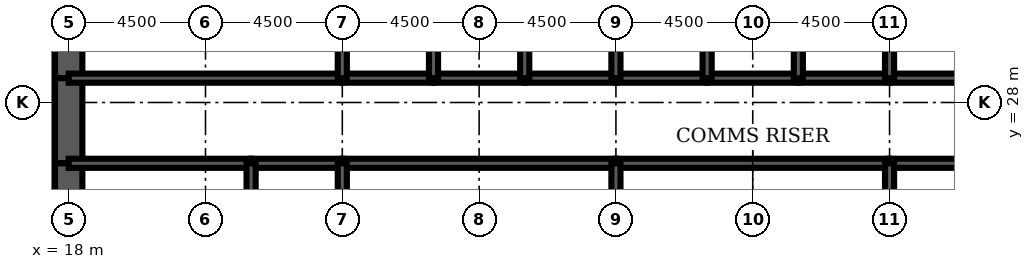
"""IFC4 building model, lengths in metres.
Left out: names, types, materials, properties, quantities, classifications, styles, units other than length and angle.
Written with IfcOpenShell. Run it as: python <this file> out.ifc"""

import sys

from ifc_helpers import new_model, si_unit, direction, frame, frame_2d, origin, place, context, subcontext, project, spatial, rectangle, extrude, element, fill, save


model = new_model("IFC4")
c1 = context("Model", 3, precision=1e-05, world=origin(), true_north=direction((0.0, 1.0)))
c2 = subcontext(c1, "Body", "Model", "MODEL_VIEW")
j1 = project(units=[si_unit("LENGTHUNIT", "METRE"), si_unit("PLANEANGLEUNIT", "RADIAN")], contexts=[c1])
p1 = place(None, origin())
s1 = spatial("IfcSite", under=j1, at=p1, CompositionType="ELEMENT")
p2 = place(p1, origin())
s2 = spatial("IfcBuilding", under=s1, at=p2, CompositionType="ELEMENT")
p3 = place(p2, frame((0.0, 0.0, 150.9)))
s3 = spatial("IfcBuildingStorey", under=s2, at=p3, CompositionType="ELEMENT", Elevation=150.9)
p4 = place(p3, frame((18.0, 32.0, 0.0), z_axis=(0.0, 0.0, 1.0), x_axis=(0.0, -1.0, 0.0)))
e1 = element("IfcWall", 1, at=p4, inside=s3, PredefinedType="SHEAR", context=c2, shape_type="SweptSolid", body=[
    extrude(rectangle(XDim=3.2, YDim=0.9, at=frame_2d((1.6, 0.0))), origin(), (0.0, 0.0, 1.0), 4.2),
])
p5 = place(p3, frame((18.0, 28.8, 0.0), z_axis=(0.0, 0.0, 1.0), x_axis=(0.0, -1.0, 0.0)))
e2 = element("IfcWall", 2, at=p5, inside=s3, PredefinedType="SHEAR", context=c2, shape_type="SweptSolid", body=[
    extrude(rectangle(XDim=2.8, YDim=0.9, at=frame_2d((1.4, 0.0))), origin(), (0.0, 0.0, 1.0), 4.2),
])
p6 = place(p5, frame((0.4, 0.0, 0.0)))
e3 = element("IfcOpeningElement", 3, at=p6, cuts=e2, PredefinedType="OPENING", context=c2, shape_type="SweptSolid", body=[
    extrude(rectangle(XDim=1.8, YDim=2.1, at=frame_2d((0.9, 1.05))), frame((0.0, 0.46, 0.0), z_axis=(0.0, -1.0, 0.0), x_axis=(1.0, 0.0, 0.0)), (0.0, 0.0, 1.0), 0.92),
])
p7 = place(p3, frame((18.0, 26.0, 0.0), z_axis=(0.0, 0.0, 1.0), x_axis=(0.0, -1.0, 0.0)))
e4 = element("IfcWall", 4, at=p7, inside=s3, PredefinedType="SHEAR", context=c2, shape_type="SweptSolid", body=[
    extrude(rectangle(XDim=4.0, YDim=0.9, at=frame_2d((2.0, 0.0))), origin(), (0.0, 0.0, 1.0), 4.2),
])
p8 = place(p3, frame((18.0, 28.8, 0.0), z_axis=(0.0, 0.0, 1.0), x_axis=(1.0, 0.0, 0.0)))
e5 = element("IfcWall", 5, at=p8, inside=s3, PredefinedType="SOLIDWALL", context=c2, shape_type="SweptSolid", body=[
    extrude(rectangle(XDim=9.0, YDim=0.3, at=frame_2d((4.5, 0.0))), origin(), (0.0, 0.0, 1.0), 4.2),
])
p9 = place(p8, frame((0.65, 0.0, 0.0)))
e6 = element("IfcOpeningElement", 6, at=p9, cuts=e5, PredefinedType="OPENING", context=c2, shape_type="SweptSolid", body=[
    extrude(rectangle(XDim=1.0, YDim=2.1, at=frame_2d((0.5, 1.05))), frame((0.0, 0.16, 0.0), z_axis=(0.0, -1.0, 0.0), x_axis=(1.0, 0.0, 0.0)), (0.0, 0.0, 1.0), 0.32),
])
p10 = place(p3, frame((27.0, 28.8, 0.0), z_axis=(0.0, 0.0, 1.0), x_axis=(1.0, 0.0, 0.0)))
e7 = element("IfcWall", 7, at=p10, inside=s3, PredefinedType="SOLIDWALL", context=c2, shape_type="SweptSolid", body=[
    extrude(rectangle(XDim=3.0, YDim=0.3, at=frame_2d((1.5, 0.0))), origin(), (0.0, 0.0, 1.0), 4.2),
])
p11 = place(p10, frame((0.95, 0.0, 0.0)))
e8 = element("IfcOpeningElement", 8, at=p11, cuts=e7, PredefinedType="OPENING", context=c2, shape_type="SweptSolid", body=[
    extrude(rectangle(XDim=1.1, YDim=2.2, at=frame_2d((0.55, 1.1))), frame((0.0, 0.16, 0.0), z_axis=(0.0, -1.0, 0.0), x_axis=(1.0, 0.0, 0.0)), (0.0, 0.0, 1.0), 0.32),
])
p12 = place(p3, frame((30.0, 28.8, 0.0), z_axis=(0.0, 0.0, 1.0), x_axis=(1.0, 0.0, 0.0)))
e9 = element("IfcWall", 9, at=p12, inside=s3, PredefinedType="SOLIDWALL", context=c2, shape_type="SweptSolid", body=[
    extrude(rectangle(XDim=3.0, YDim=0.3, at=frame_2d((1.5, 0.0))), origin(), (0.0, 0.0, 1.0), 4.2),
])
p13 = place(p12, frame((0.95, 0.0, 0.0)))
e10 = element("IfcOpeningElement", 10, at=p13, cuts=e9, PredefinedType="OPENING", context=c2, shape_type="SweptSolid", body=[
    extrude(rectangle(XDim=1.1, YDim=2.2, at=frame_2d((0.55, 1.1))), frame((0.0, 0.16, 0.0), z_axis=(0.0, -1.0, 0.0), x_axis=(1.0, 0.0, 0.0)), (0.0, 0.0, 1.0), 0.32),
])
p14 = place(p3, frame((33.0, 28.8, 0.0), z_axis=(0.0, 0.0, 1.0), x_axis=(1.0, 0.0, 0.0)))
e11 = element("IfcWall", 11, at=p14, inside=s3, PredefinedType="SOLIDWALL", context=c2, shape_type="SweptSolid", body=[
    extrude(rectangle(XDim=3.0, YDim=0.3, at=frame_2d((1.5, 0.0))), origin(), (0.0, 0.0, 1.0), 4.2),
])
p15 = place(p14, frame((0.95, 0.0, 0.0)))
e12 = element("IfcOpeningElement", 12, at=p15, cuts=e11, PredefinedType="OPENING", context=c2, shape_type="SweptSolid", body=[
    extrude(rectangle(XDim=1.1, YDim=2.2, at=frame_2d((0.55, 1.1))), frame((0.0, 0.16, 0.0), z_axis=(0.0, -1.0, 0.0), x_axis=(1.0, 0.0, 0.0)), (0.0, 0.0, 1.0), 0.32),
])
for number, where, z_axis, x_axis in (
    (13, (36.0, 28.8, 0.0), (0.0, 0.0, 1.0), (1.0, 0.0, 0.0)),
    (14, (39.0, 28.8, 0.0), (0.0, 0.0, 1.0), (1.0, 0.0, 0.0)),
):
    element("IfcWall", number, at=place(p3, frame(where, z_axis=z_axis, x_axis=x_axis)), inside=s3, PredefinedType="SOLIDWALL", context=c2, shape_type="SweptSolid", body=[
        extrude(rectangle(XDim=3.0, YDim=0.3, at=frame_2d((1.5, 0.0))), origin(), (0.0, 0.0, 1.0), 4.2),
    ])
p16 = place(p3, frame((42.0, 28.8, 0.0), z_axis=(0.0, 0.0, 1.0), x_axis=(1.0, 0.0, 0.0)))
e15 = element("IfcWall", 15, at=p16, inside=s3, PredefinedType="SOLIDWALL", context=c2, shape_type="SweptSolid", body=[
    extrude(rectangle(XDim=3.0, YDim=0.3, at=frame_2d((1.5, 0.0))), origin(), (0.0, 0.0, 1.0), 4.2),
])
p17 = place(p16, frame((0.95, 0.0, 0.0)))
e16 = element("IfcOpeningElement", 16, at=p17, cuts=e15, PredefinedType="OPENING", context=c2, shape_type="SweptSolid", body=[
    extrude(rectangle(XDim=1.1, YDim=2.2, at=frame_2d((0.55, 1.1))), frame((0.0, 0.16, 0.0), z_axis=(0.0, -1.0, 0.0), x_axis=(1.0, 0.0, 0.0)), (0.0, 0.0, 1.0), 0.32),
])
p18 = place(p3, frame((45.0, 28.8, 0.0), z_axis=(0.0, 0.0, 1.0), x_axis=(1.0, 0.0, 0.0)))
e17 = element("IfcWall", 17, at=p18, inside=s3, PredefinedType="SOLIDWALL", context=c2, shape_type="SweptSolid", body=[
    extrude(rectangle(XDim=9.0, YDim=0.3, at=frame_2d((4.5, 0.0))), origin(), (0.0, 0.0, 1.0), 4.2),
])
p19 = place(p18, frame((7.35, 0.0, 0.0)))
e18 = element("IfcOpeningElement", 18, at=p19, cuts=e17, PredefinedType="OPENING", context=c2, shape_type="SweptSolid", body=[
    extrude(rectangle(XDim=1.0, YDim=2.1, at=frame_2d((0.5, 1.05))), frame((0.0, 0.16, 0.0), z_axis=(0.0, -1.0, 0.0), x_axis=(1.0, 0.0, 0.0)), (0.0, 0.0, 1.0), 0.32),
])
p20 = place(p3, frame((18.0, 26.0, 0.0), z_axis=(0.0, 0.0, 1.0), x_axis=(1.0, 0.0, 0.0)))
e19 = element("IfcWall", 19, at=p20, inside=s3, PredefinedType="SOLIDWALL", context=c2, shape_type="SweptSolid", body=[
    extrude(rectangle(XDim=6.0, YDim=0.3, at=frame_2d((3.0, 0.0))), origin(), (0.0, 0.0, 1.0), 4.2),
])
p21 = place(p3, frame((24.0, 26.0, 0.0), z_axis=(0.0, 0.0, 1.0), x_axis=(1.0, 0.0, 0.0)))
e20 = element("IfcWall", 20, at=p21, inside=s3, PredefinedType="SOLIDWALL", context=c2, shape_type="SweptSolid", body=[
    extrude(rectangle(XDim=3.0, YDim=0.3, at=frame_2d((1.5, 0.0))), origin(), (0.0, 0.0, 1.0), 4.2),
])
for number, where, z_axis, x_axis in (
    (21, (27.0, 26.0, 0.0), (0.0, 0.0, 1.0), (1.0, 0.0, 0.0)),
    (22, (36.0, 26.0, 0.0), (0.0, 0.0, 1.0), (1.0, 0.0, 0.0)),
):
    element("IfcWall", number, at=place(p3, frame(where, z_axis=z_axis, x_axis=x_axis)), inside=s3, PredefinedType="SOLIDWALL", context=c2, shape_type="SweptSolid", body=[
        extrude(rectangle(XDim=9.0, YDim=0.3, at=frame_2d((4.5, 0.0))), origin(), (0.0, 0.0, 1.0), 4.2),
    ])
p22 = place(p3, frame((45.0, 26.0, 0.0), z_axis=(0.0, 0.0, 1.0), x_axis=(1.0, 0.0, 0.0)))
e23 = element("IfcWall", 23, at=p22, inside=s3, PredefinedType="SOLIDWALL", context=c2, shape_type="SweptSolid", body=[
    extrude(rectangle(XDim=3.0, YDim=0.3, at=frame_2d((1.5, 0.0))), origin(), (0.0, 0.0, 1.0), 4.2),
])
for number, where, z_axis, x_axis in (
    (24, (27.0, 28.8, 0.0), (0.0, 0.0, 1.0), (0.0, 1.0, 0.0)),
    (25, (30.0, 28.8, 0.0), (0.0, 0.0, 1.0), (0.0, 1.0, 0.0)),
    (26, (33.0, 28.8, 0.0), (0.0, 0.0, 1.0), (0.0, 1.0, 0.0)),
    (27, (36.0, 28.8, 0.0), (0.0, 0.0, 1.0), (0.0, 1.0, 0.0)),
    (28, (39.0, 28.8, 0.0), (0.0, 0.0, 1.0), (0.0, 1.0, 0.0)),
    (29, (42.0, 28.8, 0.0), (0.0, 0.0, 1.0), (0.0, 1.0, 0.0)),
    (30, (45.0, 28.8, 0.0), (0.0, 0.0, 1.0), (0.0, 1.0, 0.0)),
):
    element("IfcWall", number, at=place(p3, frame(where, z_axis=z_axis, x_axis=x_axis)), inside=s3, PredefinedType="SOLIDWALL", context=c2, shape_type="SweptSolid", body=[
        extrude(rectangle(XDim=3.2, YDim=0.3, at=frame_2d((1.6, 0.0))), origin(), (0.0, 0.0, 1.0), 4.2),
    ])
for number, where, z_axis, x_axis in (
    (31, (24.0, 22.0, 0.0), (0.0, 0.0, 1.0), (0.0, 1.0, 0.0)),
    (32, (27.0, 22.0, 0.0), (0.0, 0.0, 1.0), (0.0, 1.0, 0.0)),
    (33, (36.0, 22.0, 0.0), (0.0, 0.0, 1.0), (0.0, 1.0, 0.0)),
    (34, (45.0, 22.0, 0.0), (0.0, 0.0, 1.0), (0.0, 1.0, 0.0)),
):
    element("IfcWall", number, at=place(p3, frame(where, z_axis=z_axis, x_axis=x_axis)), inside=s3, PredefinedType="SOLIDWALL", context=c2, shape_type="SweptSolid", body=[
        extrude(rectangle(XDim=4.0, YDim=0.3, at=frame_2d((2.0, 0.0))), origin(), (0.0, 0.0, 1.0), 4.2),
    ])
p23 = place(p3, frame((42.5, 22.15, 0.0), z_axis=(0.0, 0.0, 1.0), x_axis=(0.0, 1.0, 0.0)))
e35 = element("IfcWall", 35, at=p23, inside=s3, PredefinedType="PARTITIONING", context=c2, shape_type="SweptSolid", body=[
    extrude(rectangle(XDim=3.7, YDim=0.15, at=frame_2d((1.85, 0.0))), origin(), (0.0, 0.0, 1.0), 3.0),
])
p24 = place(p23, frame((2.2, 0.0, 0.0)))
e36 = element("IfcOpeningElement", 36, at=p24, cuts=e35, PredefinedType="OPENING", context=c2, shape_type="SweptSolid", body=[
    extrude(rectangle(XDim=1.0, YDim=2.1, at=frame_2d((0.5, 1.05))), frame((0.0, 0.085, 0.0), z_axis=(0.0, -1.0, 0.0), x_axis=(1.0, 0.0, 0.0)), (0.0, 0.0, 1.0), 0.17),
])
p25 = place(p3, frame((20.325, 22.15, 0.0), z_axis=(0.0, 0.0, 1.0), x_axis=(0.0, 1.0, 0.0)))
e37 = element("IfcWall", 37, at=p25, inside=s3, PredefinedType="PARTITIONING", context=c2, shape_type="SweptSolid", body=[
    extrude(rectangle(XDim=3.7, YDim=0.15, at=frame_2d((1.85, 0.0))), origin(), (0.0, 0.0, 1.0), 3.0),
])
p26 = place(p3, frame((46.2, 26.15, 0.0), z_axis=(0.0, 0.0, 1.0), x_axis=(0.0, 1.0, 0.0)))
e38 = element("IfcWall", 38, at=p26, inside=s3, PredefinedType="PARTITIONING", context=c2, shape_type="SweptSolid", body=[
    extrude(rectangle(XDim=2.5, YDim=0.15, at=frame_2d((1.25, 0.0))), origin(), (0.0, 0.0, 1.0), 3.0),
])
p27 = place(p26, frame((1.15, 0.0, 0.0)))
e39 = element("IfcOpeningElement", 39, at=p27, cuts=e38, PredefinedType="OPENING", context=c2, shape_type="SweptSolid", body=[
    extrude(rectangle(XDim=1.0, YDim=2.1, at=frame_2d((0.5, 1.05))), frame((0.0, 0.085, 0.0), z_axis=(0.0, -1.0, 0.0), x_axis=(1.0, 0.0, 0.0)), (0.0, 0.0, 1.0), 0.17),
])
p28 = place(p24, origin())
e40 = element("IfcDoor", 40, at=p28, inside=s3, OperationType="SINGLE_SWING_RIGHT", PredefinedType="DOOR", context=c2, shape_type="SweptSolid", body=[
    extrude(rectangle(XDim=1.0, YDim=2.1, at=frame_2d((0.5, 1.05))), frame((0.0, 0.025, 0.0), z_axis=(0.0, -1.0, 0.0), x_axis=(1.0, 0.0, 0.0)), (0.0, 0.0, 1.0), 0.05),
])
fill(e36, e40)
p29 = place(p27, origin())
e41 = element("IfcDoor", 41, at=p29, inside=s3, OperationType="SINGLE_SWING_RIGHT", PredefinedType="DOOR", context=c2, shape_type="SweptSolid", body=[
    extrude(rectangle(XDim=1.0, YDim=2.1, at=frame_2d((0.5, 1.05))), frame((0.0, 0.025, 0.0), z_axis=(0.0, -1.0, 0.0), x_axis=(1.0, 0.0, 0.0)), (0.0, 0.0, 1.0), 0.05),
])
fill(e39, e41)
p30 = place(p17, origin())
e42 = element("IfcDoor", 42, at=p30, inside=s3, OperationType="DOUBLE_DOOR_SLIDING", PredefinedType="USERDEFINED", context=c2, shape_type="SweptSolid", body=[
    extrude(rectangle(XDim=1.1, YDim=2.2, at=frame_2d((0.55, 1.1))), frame((0.0, 0.025, 0.0), z_axis=(0.0, -1.0, 0.0), x_axis=(1.0, 0.0, 0.0)), (0.0, 0.0, 1.0), 0.05),
])
fill(e16, e42)
p31 = place(p11, origin())
e43 = element("IfcDoor", 43, at=p31, inside=s3, OperationType="DOUBLE_DOOR_SLIDING", PredefinedType="USERDEFINED", context=c2, shape_type="SweptSolid", body=[
    extrude(rectangle(XDim=1.1, YDim=2.2, at=frame_2d((0.55, 1.1))), frame((0.0, 0.025, 0.0), z_axis=(0.0, -1.0, 0.0), x_axis=(1.0, 0.0, 0.0)), (0.0, 0.0, 1.0), 0.05),
])
fill(e8, e43)
p32 = place(p13, origin())
e44 = element("IfcDoor", 44, at=p32, inside=s3, OperationType="DOUBLE_DOOR_SLIDING", PredefinedType="USERDEFINED", context=c2, shape_type="SweptSolid", body=[
    extrude(rectangle(XDim=1.1, YDim=2.2, at=frame_2d((0.55, 1.1))), frame((0.0, 0.025, 0.0), z_axis=(0.0, -1.0, 0.0), x_axis=(1.0, 0.0, 0.0)), (0.0, 0.0, 1.0), 0.05),
])
fill(e10, e44)
p33 = place(p15, origin())
e45 = element("IfcDoor", 45, at=p33, inside=s3, OperationType="DOUBLE_DOOR_SLIDING", PredefinedType="USERDEFINED", context=c2, shape_type="SweptSolid", body=[
    extrude(rectangle(XDim=1.1, YDim=2.2, at=frame_2d((0.55, 1.1))), frame((0.0, 0.025, 0.0), z_axis=(0.0, -1.0, 0.0), x_axis=(1.0, 0.0, 0.0)), (0.0, 0.0, 1.0), 0.05),
])
fill(e12, e45)
p34 = place(p9, origin())
e46 = element("IfcDoor", 46, at=p34, inside=s3, OperationType="SINGLE_SWING_LEFT", PredefinedType="DOOR", context=c2, shape_type="SweptSolid", body=[
    extrude(rectangle(XDim=1.0, YDim=2.1, at=frame_2d((0.5, 1.05))), frame((0.0, 0.025, 0.0), z_axis=(0.0, -1.0, 0.0), x_axis=(1.0, 0.0, 0.0)), (0.0, 0.0, 1.0), 0.05),
])
fill(e6, e46)
p35 = place(p6, origin())
e47 = element("IfcDoor", 47, at=p35, inside=s3, OperationType="SINGLE_SWING_LEFT", PredefinedType="DOOR", context=c2, shape_type="SweptSolid", body=[
    extrude(rectangle(XDim=1.8, YDim=2.1, at=frame_2d((0.9, 1.05))), frame((0.0, 0.45, 0.0), z_axis=(0.0, -1.0, 0.0), x_axis=(1.0, 0.0, 0.0)), (0.0, 0.0, 1.0), 0.899),
])
fill(e3, e47)
save(model, sys.argv[1])
